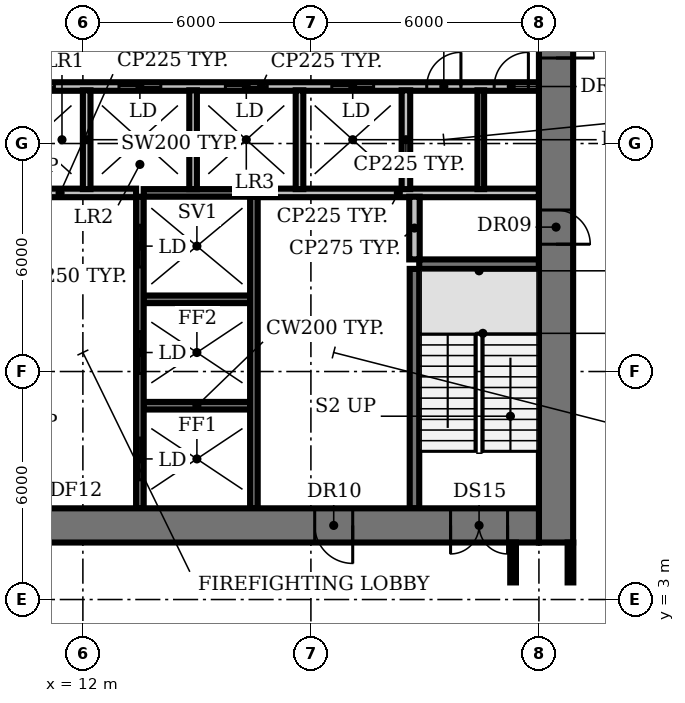
"""IFC4 building model, lengths in metres.
Left out: names, types, materials, properties, quantities, classifications, styles, units other than length and angle.
Written with IfcOpenShell. Run it as: python <this file> out.ifc"""

import sys

from ifc_helpers import new_model, si_unit, direction, frame, frame_2d, origin, place, context, subcontext, project, spatial, rectangle, extrude, element, fill, save


model = new_model("IFC4")
c1 = context("Model", 3, precision=1e-05, world=origin(), true_north=direction((0.0, 1.0)))
c2 = subcontext(c1, "Body", "Model", "MODEL_VIEW")
j1 = project(units=[si_unit("LENGTHUNIT", "METRE"), si_unit("PLANEANGLEUNIT", "RADIAN")], contexts=[c1])
p1 = place(None, origin())
s1 = spatial("IfcSite", under=j1, at=p1, CompositionType="ELEMENT")
p2 = place(p1, origin())
s2 = spatial("IfcBuilding", under=s1, at=p2, CompositionType="ELEMENT")
p3 = place(p2, frame((0.0, 0.0, 20.0)))
s3 = spatial("IfcBuildingStorey", under=s2, at=p3, CompositionType="ELEMENT", Elevation=20.0)
for number, where, z_axis, x_axis in (
    (1, (13.6, 8.1, 0.0), (0.0, 0.0, 1.0), (1.0, 0.0, 0.0)),
    (2, (13.6, 10.9, 0.0), (0.0, 0.0, 1.0), (1.0, 0.0, 0.0)),
):
    element("IfcWall", number, at=place(p3, frame(where, z_axis=z_axis, x_axis=x_axis)), inside=s3, PredefinedType="SHEAR", context=c2, shape_type="SweptSolid", body=[
        extrude(rectangle(XDim=2.8, YDim=0.2, at=frame_2d((1.4, 0.0))), origin(), (0.0, 0.0, 1.0), 4.15),
    ])
p4 = place(p3, frame((20.85, 11.825, 0.0), z_axis=(0.0, 0.0, 1.0), x_axis=(1.0, 0.0, 0.0)))
e3 = element("IfcWall", 3, at=p4, inside=s3, PredefinedType="SHEAR", context=c2, shape_type="SweptSolid", body=[
    extrude(rectangle(XDim=3.15, YDim=0.25, at=frame_2d((1.575, 0.0))), origin(), (0.0, 0.0, 1.0), 4.15),
])
p5 = place(p3, frame((9.4, 13.7, 0.0), z_axis=(0.0, 0.0, 1.0), x_axis=(1.0, 0.0, 0.0)))
e4 = element("IfcWall", 4, at=p5, inside=s3, PredefinedType="PARTITIONING", context=c2, shape_type="SweptSolid", body=[
    extrude(rectangle(XDim=4.0, YDim=0.225, at=frame_2d((2.0, 0.0))), origin(), (0.0, 0.0, 1.0), 4.15),
])
p6 = place(p3, frame((13.6, 13.7, 0.0), z_axis=(0.0, 0.0, 1.0), x_axis=(1.0, 0.0, 0.0)))
e5 = element("IfcWall", 5, at=p6, inside=s3, PredefinedType="SHEAR", context=c2, shape_type="SweptSolid", body=[
    extrude(rectangle(XDim=2.8, YDim=0.2, at=frame_2d((1.4, 0.0))), origin(), (0.0, 0.0, 1.0), 4.15),
])
p7 = place(p3, frame((16.6, 13.7, 0.0), z_axis=(0.0, 0.0, 1.0), x_axis=(1.0, 0.0, 0.0)))
e6 = element("IfcWall", 6, at=p7, inside=s3, PredefinedType="PARTITIONING", context=c2, shape_type="SweptSolid", body=[
    extrude(rectangle(XDim=7.4, YDim=0.225, at=frame_2d((3.7, 0.0))), origin(), (0.0, 0.0, 1.0), 4.15),
])
p8 = place(p3, frame((9.4, 16.5, 0.0), z_axis=(0.0, 0.0, 1.0), x_axis=(1.0, 0.0, 0.0)))
e7 = element("IfcWall", 7, at=p8, inside=s3, PredefinedType="PARTITIONING", context=c2, shape_type="SweptSolid", body=[
    extrude(rectangle(XDim=14.6, YDim=0.225, at=frame_2d((7.3, 0.0))), origin(), (0.0, 0.0, 1.0), 4.15),
])
p9 = place(p8, frame((0.75, 0.0, 0.0)))
e8 = element("IfcOpeningElement", 8, at=p9, cuts=e7, PredefinedType="OPENING", context=c2, shape_type="SweptSolid", body=[
    extrude(rectangle(XDim=1.1, YDim=2.1, at=frame_2d((0.55, 1.05))), frame((0.0, 0.123, 0.0), z_axis=(0.0, -1.0, 0.0), x_axis=(1.0, 0.0, 0.0)), (0.0, 0.0, 1.0), 0.245),
])
p10 = place(p8, frame((3.55, 0.0, 0.0)))
e9 = element("IfcOpeningElement", 9, at=p10, cuts=e7, PredefinedType="OPENING", context=c2, shape_type="SweptSolid", body=[
    extrude(rectangle(XDim=1.1, YDim=2.1, at=frame_2d((0.55, 1.05))), frame((0.0, 0.123, 0.0), z_axis=(0.0, -1.0, 0.0), x_axis=(1.0, 0.0, 0.0)), (0.0, 0.0, 1.0), 0.245),
])
p11 = place(p8, frame((6.35, 0.0, 0.0)))
e10 = element("IfcOpeningElement", 10, at=p11, cuts=e7, PredefinedType="OPENING", context=c2, shape_type="SweptSolid", body=[
    extrude(rectangle(XDim=1.1, YDim=2.1, at=frame_2d((0.55, 1.05))), frame((0.0, 0.123, 0.0), z_axis=(0.0, -1.0, 0.0), x_axis=(1.0, 0.0, 0.0)), (0.0, 0.0, 1.0), 0.245),
])
p12 = place(p8, frame((9.15, 0.0, 0.0)))
e11 = element("IfcOpeningElement", 11, at=p12, cuts=e7, PredefinedType="OPENING", context=c2, shape_type="SweptSolid", body=[
    extrude(rectangle(XDim=1.1, YDim=2.1, at=frame_2d((0.55, 1.05))), frame((0.0, 0.123, 0.0), z_axis=(0.0, -1.0, 0.0), x_axis=(1.0, 0.0, 0.0)), (0.0, 0.0, 1.0), 0.245),
])
p13 = place(p8, frame((11.647, 0.0, 0.0)))
e12 = element("IfcOpeningElement", 12, at=p13, cuts=e7, PredefinedType="OPENING", context=c2, shape_type="SweptSolid", body=[
    extrude(rectangle(XDim=0.9, YDim=2.1, at=frame_2d((0.45, 1.05))), frame((0.0, 0.123, 0.0), z_axis=(0.0, -1.0, 0.0), x_axis=(1.0, 0.0, 0.0)), (0.0, 0.0, 1.0), 0.245),
])
p14 = place(p8, frame((13.423, 0.0, 0.0)))
e13 = element("IfcOpeningElement", 13, at=p14, cuts=e7, PredefinedType="OPENING", context=c2, shape_type="SweptSolid", body=[
    extrude(rectangle(XDim=0.9, YDim=2.1, at=frame_2d((0.45, 1.05))), frame((0.0, 0.123, 0.0), z_axis=(0.0, -1.0, 0.0), x_axis=(1.0, 0.0, 0.0)), (0.0, 0.0, 1.0), 0.245),
])
p15 = place(p3, frame((12.1, 13.8, 0.0), z_axis=(0.0, 0.0, 1.0), x_axis=(0.0, 1.0, 0.0)))
e14 = element("IfcWall", 14, at=p15, inside=s3, PredefinedType="SOLIDWALL", context=c2, shape_type="SweptSolid", body=[
    extrude(rectangle(XDim=2.6, YDim=0.2, at=frame_2d((1.3, 0.0))), origin(), (0.0, 0.0, 1.0), 4.15),
])
p16 = place(p3, frame((13.5, 5.4, 0.0), z_axis=(0.0, 0.0, 1.0), x_axis=(0.0, 1.0, 0.0)))
e15 = element("IfcWall", 15, at=p16, inside=s3, PredefinedType="SHEAR", context=c2, shape_type="SweptSolid", body=[
    extrude(rectangle(XDim=8.2, YDim=0.2, at=frame_2d((4.1, 0.0))), origin(), (0.0, 0.0, 1.0), 4.15),
])
p17 = place(p16, frame((0.75, 0.0, 0.0)))
e16 = element("IfcOpeningElement", 16, at=p17, cuts=e15, PredefinedType="OPENING", context=c2, shape_type="SweptSolid", body=[
    extrude(rectangle(XDim=1.1, YDim=2.1, at=frame_2d((0.55, 1.05))), frame((0.0, 0.11, 0.0), z_axis=(0.0, -1.0, 0.0), x_axis=(1.0, 0.0, 0.0)), (0.0, 0.0, 1.0), 0.22),
])
p18 = place(p16, frame((3.55, 0.0, 0.0)))
e17 = element("IfcOpeningElement", 17, at=p18, cuts=e15, PredefinedType="OPENING", context=c2, shape_type="SweptSolid", body=[
    extrude(rectangle(XDim=1.1, YDim=2.1, at=frame_2d((0.55, 1.05))), frame((0.0, 0.11, 0.0), z_axis=(0.0, -1.0, 0.0), x_axis=(1.0, 0.0, 0.0)), (0.0, 0.0, 1.0), 0.22),
])
p19 = place(p16, frame((6.35, 0.0, 0.0)))
e18 = element("IfcOpeningElement", 18, at=p19, cuts=e15, PredefinedType="OPENING", context=c2, shape_type="SweptSolid", body=[
    extrude(rectangle(XDim=1.1, YDim=2.1, at=frame_2d((0.55, 1.05))), frame((0.0, 0.11, 0.0), z_axis=(0.0, -1.0, 0.0), x_axis=(1.0, 0.0, 0.0)), (0.0, 0.0, 1.0), 0.22),
])
p20 = place(p3, frame((14.9, 13.8, 0.0), z_axis=(0.0, 0.0, 1.0), x_axis=(0.0, 1.0, 0.0)))
e19 = element("IfcWall", 19, at=p20, inside=s3, PredefinedType="SOLIDWALL", context=c2, shape_type="SweptSolid", body=[
    extrude(rectangle(XDim=2.6, YDim=0.2, at=frame_2d((1.3, 0.0))), origin(), (0.0, 0.0, 1.0), 4.15),
])
p21 = place(p3, frame((16.5, 5.4, 0.0), z_axis=(0.0, 0.0, 1.0), x_axis=(0.0, 1.0, 0.0)))
e20 = element("IfcWall", 20, at=p21, inside=s3, PredefinedType="SHEAR", context=c2, shape_type="SweptSolid", body=[
    extrude(rectangle(XDim=8.2, YDim=0.2, at=frame_2d((4.1, 0.0))), origin(), (0.0, 0.0, 1.0), 4.15),
])
p22 = place(p3, frame((17.7, 13.8, 0.0), z_axis=(0.0, 0.0, 1.0), x_axis=(0.0, 1.0, 0.0)))
e21 = element("IfcWall", 21, at=p22, inside=s3, PredefinedType="SOLIDWALL", context=c2, shape_type="SweptSolid", body=[
    extrude(rectangle(XDim=2.6, YDim=0.2, at=frame_2d((1.3, 0.0))), origin(), (0.0, 0.0, 1.0), 4.15),
])
p23 = place(p3, frame((20.5, 13.8, 0.0), z_axis=(0.0, 0.0, 1.0), x_axis=(0.0, 1.0, 0.0)))
e22 = element("IfcWall", 22, at=p23, inside=s3, PredefinedType="PARTITIONING", context=c2, shape_type="SweptSolid", body=[
    extrude(rectangle(XDim=2.6, YDim=0.225, at=frame_2d((1.3, 0.0))), origin(), (0.0, 0.0, 1.0), 4.15),
])
p24 = place(p3, frame((20.725, 5.4, 0.0), z_axis=(0.0, 0.0, 1.0), x_axis=(0.0, 1.0, 0.0)))
e23 = element("IfcWall", 23, at=p24, inside=s3, PredefinedType="SHEAR", context=c2, shape_type="SweptSolid", body=[
    extrude(rectangle(XDim=6.3, YDim=0.25, at=frame_2d((3.15, 0.0))), origin(), (0.0, 0.0, 1.0), 4.15),
])
p25 = place(p3, frame((20.725, 11.95, 0.0), z_axis=(0.0, 0.0, 1.0), x_axis=(0.0, 1.0, 0.0)))
e24 = element("IfcWall", 24, at=p25, inside=s3, PredefinedType="PARTITIONING", context=c2, shape_type="SweptSolid", body=[
    extrude(rectangle(XDim=1.65, YDim=0.275, at=frame_2d((0.825, 0.0))), origin(), (0.0, 0.0, 1.0), 4.15),
])
p26 = place(p3, frame((22.47, 13.8, 0.0), z_axis=(0.0, 0.0, 1.0), x_axis=(0.0, 1.0, 0.0)))
e25 = element("IfcWall", 25, at=p26, inside=s3, PredefinedType="PARTITIONING", context=c2, shape_type="SweptSolid", body=[
    extrude(rectangle(XDim=2.6, YDim=0.175, at=frame_2d((1.3, 0.0))), origin(), (0.0, 0.0, 1.0), 4.15),
])
p27 = place(p3, frame((24.45, 25.7, 0.0), z_axis=(0.0, 0.0, 1.0), x_axis=(0.0, -1.0, 0.0)))
e26 = element("IfcWall", 26, at=p27, inside=s3, PredefinedType="SHEAR", context=c2, shape_type="SweptSolid", body=[
    extrude(rectangle(XDim=21.2, YDim=0.9, at=frame_2d((10.6, 0.0))), origin(), (0.0, 0.0, 1.0), 4.15),
])
p28 = place(p27, frame((12.45, 0.0, 0.0)))
e27 = element("IfcOpeningElement", 27, at=p28, cuts=e26, PredefinedType="OPENING", context=c2, shape_type="SweptSolid", body=[
    extrude(rectangle(XDim=0.9, YDim=2.1, at=frame_2d((0.45, 1.05))), frame((0.0, 0.46, 0.0), z_axis=(0.0, -1.0, 0.0), x_axis=(1.0, 0.0, 0.0)), (0.0, 0.0, 1.0), 0.92),
])
p29 = place(p27, frame((6.45, 0.0, 0.0)))
e28 = element("IfcOpeningElement", 28, at=p29, cuts=e26, PredefinedType="OPENING", context=c2, shape_type="SweptSolid", body=[
    extrude(rectangle(XDim=2.0, YDim=2.1, at=frame_2d((1.0, 1.05))), frame((0.0, 0.46, 0.0), z_axis=(0.0, -1.0, 0.0), x_axis=(1.0, 0.0, 0.0)), (0.0, 0.0, 1.0), 0.92),
])
p30 = place(p3, frame((24.0, 4.95, 0.0), z_axis=(0.0, 0.0, 1.0), x_axis=(-1.0, 0.0, 0.0)))
e29 = element("IfcWall", 29, at=p30, inside=s3, PredefinedType="SHEAR", context=c2, shape_type="SweptSolid", body=[
    extrude(rectangle(XDim=18.0, YDim=0.9, at=frame_2d((9.0, 0.0))), origin(), (0.0, 0.0, 1.0), 4.15),
])
p31 = place(p30, frame((15.675, 0.0, 0.0)))
e30 = element("IfcOpeningElement", 30, at=p31, cuts=e29, PredefinedType="OPENING", context=c2, shape_type="SweptSolid", body=[
    extrude(rectangle(XDim=1.5, YDim=2.1, at=frame_2d((0.75, 1.05))), frame((0.0, 0.46, 0.0), z_axis=(0.0, -1.0, 0.0), x_axis=(1.0, 0.0, 0.0)), (0.0, 0.0, 1.0), 0.92),
])
p32 = place(p30, frame((0.825, 0.0, 0.0)))
e31 = element("IfcOpeningElement", 31, at=p32, cuts=e29, PredefinedType="OPENING", context=c2, shape_type="SweptSolid", body=[
    extrude(rectangle(XDim=1.5, YDim=2.1, at=frame_2d((0.75, 1.05))), frame((0.0, 0.46, 0.0), z_axis=(0.0, -1.0, 0.0), x_axis=(1.0, 0.0, 0.0)), (0.0, 0.0, 1.0), 0.92),
])
p33 = place(p30, frame((13.0, 0.0, 0.0)))
e32 = element("IfcOpeningElement", 32, at=p33, cuts=e29, PredefinedType="OPENING", context=c2, shape_type="SweptSolid", body=[
    extrude(rectangle(XDim=1.2, YDim=2.1, at=frame_2d((0.6, 1.05))), frame((0.0, 0.46, 0.0), z_axis=(0.0, -1.0, 0.0), x_axis=(1.0, 0.0, 0.0)), (0.0, 0.0, 1.0), 0.92),
])
p34 = place(p30, frame((4.9, 0.0, 0.0)))
e33 = element("IfcOpeningElement", 33, at=p34, cuts=e29, PredefinedType="OPENING", context=c2, shape_type="SweptSolid", body=[
    extrude(rectangle(XDim=1.0, YDim=2.1, at=frame_2d((0.5, 1.05))), frame((0.0, 0.46, 0.0), z_axis=(0.0, -1.0, 0.0), x_axis=(1.0, 0.0, 0.0)), (0.0, 0.0, 1.0), 0.92),
])
for number, where, z_axis, x_axis in (
    (34, (23.32, 3.45, 0.0), (0.0, 0.0, 1.0), (0.0, 1.0, 0.0)),
    (35, (24.83, 3.45, 0.0), (0.0, 0.0, 1.0), (0.0, 1.0, 0.0)),
):
    element("IfcWall", number, at=place(p3, frame(where, z_axis=z_axis, x_axis=x_axis)), inside=s3, PredefinedType="PARTITIONING", context=c2, shape_type="SweptSolid", body=[
        extrude(rectangle(XDim=1.05, YDim=0.15, at=frame_2d((0.525, 0.0))), origin(), (0.0, 0.0, 1.0), 3.08),
    ])
p35 = place(p9, origin())
e36 = element("IfcDoor", 36, at=p35, inside=s3, OperationType="DOUBLE_DOOR_SLIDING", PredefinedType="DOOR", context=c2, shape_type="SweptSolid", body=[
    extrude(rectangle(XDim=1.1, YDim=2.1, at=frame_2d((0.55, 1.05))), frame((0.0, 0.025, 0.0), z_axis=(0.0, -1.0, 0.0), x_axis=(1.0, 0.0, 0.0)), (0.0, 0.0, 1.0), 0.05),
])
fill(e8, e36)
p36 = place(p10, origin())
e37 = element("IfcDoor", 37, at=p36, inside=s3, OperationType="DOUBLE_DOOR_SLIDING", PredefinedType="DOOR", context=c2, shape_type="SweptSolid", body=[
    extrude(rectangle(XDim=1.1, YDim=2.1, at=frame_2d((0.55, 1.05))), frame((0.0, 0.025, 0.0), z_axis=(0.0, -1.0, 0.0), x_axis=(1.0, 0.0, 0.0)), (0.0, 0.0, 1.0), 0.05),
])
fill(e9, e37)
p37 = place(p11, origin())
e38 = element("IfcDoor", 38, at=p37, inside=s3, OperationType="DOUBLE_DOOR_SLIDING", PredefinedType="DOOR", context=c2, shape_type="SweptSolid", body=[
    extrude(rectangle(XDim=1.1, YDim=2.1, at=frame_2d((0.55, 1.05))), frame((0.0, 0.025, 0.0), z_axis=(0.0, -1.0, 0.0), x_axis=(1.0, 0.0, 0.0)), (0.0, 0.0, 1.0), 0.05),
])
fill(e10, e38)
p38 = place(p12, origin())
e39 = element("IfcDoor", 39, at=p38, inside=s3, OperationType="DOUBLE_DOOR_SLIDING", PredefinedType="DOOR", context=c2, shape_type="SweptSolid", body=[
    extrude(rectangle(XDim=1.1, YDim=2.1, at=frame_2d((0.55, 1.05))), frame((0.0, 0.025, 0.0), z_axis=(0.0, -1.0, 0.0), x_axis=(1.0, 0.0, 0.0)), (0.0, 0.0, 1.0), 0.05),
])
fill(e11, e39)
p39 = place(p13, origin())
e40 = element("IfcDoor", 40, at=p39, inside=s3, OperationType="SINGLE_SWING_RIGHT", PredefinedType="DOOR", context=c2, shape_type="SweptSolid", body=[
    extrude(rectangle(XDim=0.9, YDim=2.1, at=frame_2d((0.45, 1.05))), frame((0.0, 0.025, 0.0), z_axis=(0.0, -1.0, 0.0), x_axis=(1.0, 0.0, 0.0)), (0.0, 0.0, 1.0), 0.05),
])
fill(e12, e40)
p40 = place(p14, origin())
e41 = element("IfcDoor", 41, at=p40, inside=s3, OperationType="SINGLE_SWING_RIGHT", PredefinedType="DOOR", context=c2, shape_type="SweptSolid", body=[
    extrude(rectangle(XDim=0.9, YDim=2.1, at=frame_2d((0.45, 1.05))), frame((0.0, 0.025, 0.0), z_axis=(0.0, -1.0, 0.0), x_axis=(1.0, 0.0, 0.0)), (0.0, 0.0, 1.0), 0.05),
])
fill(e13, e41)
p41 = place(p17, origin())
e42 = element("IfcDoor", 42, at=p41, inside=s3, OperationType="DOUBLE_DOOR_SLIDING", PredefinedType="DOOR", context=c2, shape_type="SweptSolid", body=[
    extrude(rectangle(XDim=1.1, YDim=2.1, at=frame_2d((0.55, 1.05))), frame((0.0, 0.025, 0.0), z_axis=(0.0, -1.0, 0.0), x_axis=(1.0, 0.0, 0.0)), (0.0, 0.0, 1.0), 0.05),
])
fill(e16, e42)
p42 = place(p18, origin())
e43 = element("IfcDoor", 43, at=p42, inside=s3, OperationType="DOUBLE_DOOR_SLIDING", PredefinedType="DOOR", context=c2, shape_type="SweptSolid", body=[
    extrude(rectangle(XDim=1.1, YDim=2.1, at=frame_2d((0.55, 1.05))), frame((0.0, 0.025, 0.0), z_axis=(0.0, -1.0, 0.0), x_axis=(1.0, 0.0, 0.0)), (0.0, 0.0, 1.0), 0.05),
])
fill(e17, e43)
p43 = place(p19, origin())
e44 = element("IfcDoor", 44, at=p43, inside=s3, OperationType="DOUBLE_DOOR_SLIDING", PredefinedType="DOOR", context=c2, shape_type="SweptSolid", body=[
    extrude(rectangle(XDim=1.1, YDim=2.1, at=frame_2d((0.55, 1.05))), frame((0.0, 0.025, 0.0), z_axis=(0.0, -1.0, 0.0), x_axis=(1.0, 0.0, 0.0)), (0.0, 0.0, 1.0), 0.05),
])
fill(e18, e44)
p44 = place(p28, origin())
e45 = element("IfcDoor", 45, at=p44, inside=s3, OperationType="SINGLE_SWING_RIGHT", PredefinedType="DOOR", context=c2, shape_type="SweptSolid", body=[
    extrude(rectangle(XDim=0.9, YDim=2.1, at=frame_2d((0.45, 1.05))), frame((0.0, -0.39, 0.0), z_axis=(0.0, -1.0, 0.0), x_axis=(1.0, 0.0, 0.0)), (0.0, 0.0, 1.0), 0.05),
])
fill(e27, e45)
p45 = place(p29, origin())
e46 = element("IfcDoor", 46, at=p45, inside=s3, OperationType="DOUBLE_DOOR_SINGLE_SWING", PredefinedType="DOOR", context=c2, shape_type="SweptSolid", body=[
    extrude(rectangle(XDim=2.0, YDim=2.1, at=frame_2d((1.0, 1.05))), frame((0.0, 0.025, 0.0), z_axis=(0.0, -1.0, 0.0), x_axis=(1.0, 0.0, 0.0)), (0.0, 0.0, 1.0), 0.05),
])
fill(e28, e46)
p46 = place(p32, origin())
e47 = element("IfcDoor", 47, at=p46, inside=s3, OperationType="DOUBLE_DOOR_SINGLE_SWING", PredefinedType="DOOR", context=c2, shape_type="SweptSolid", body=[
    extrude(rectangle(XDim=1.5, YDim=2.1, at=frame_2d((0.75, 1.05))), frame((0.0, 0.025, 0.0), z_axis=(0.0, -1.0, 0.0), x_axis=(1.0, 0.0, 0.0)), (0.0, 0.0, 1.0), 0.05),
])
fill(e31, e47)
p47 = place(p34, origin())
e48 = element("IfcDoor", 48, at=p47, inside=s3, OperationType="SINGLE_SWING_LEFT", PredefinedType="DOOR", context=c2, shape_type="SweptSolid", body=[
    extrude(rectangle(XDim=1.0, YDim=2.1, at=frame_2d((0.5, 1.05))), frame((0.0, -0.39, 0.0), z_axis=(0.0, -1.0, 0.0), x_axis=(1.0, 0.0, 0.0)), (0.0, 0.0, 1.0), 0.05),
])
fill(e33, e48)
save(model, sys.argv[1])
